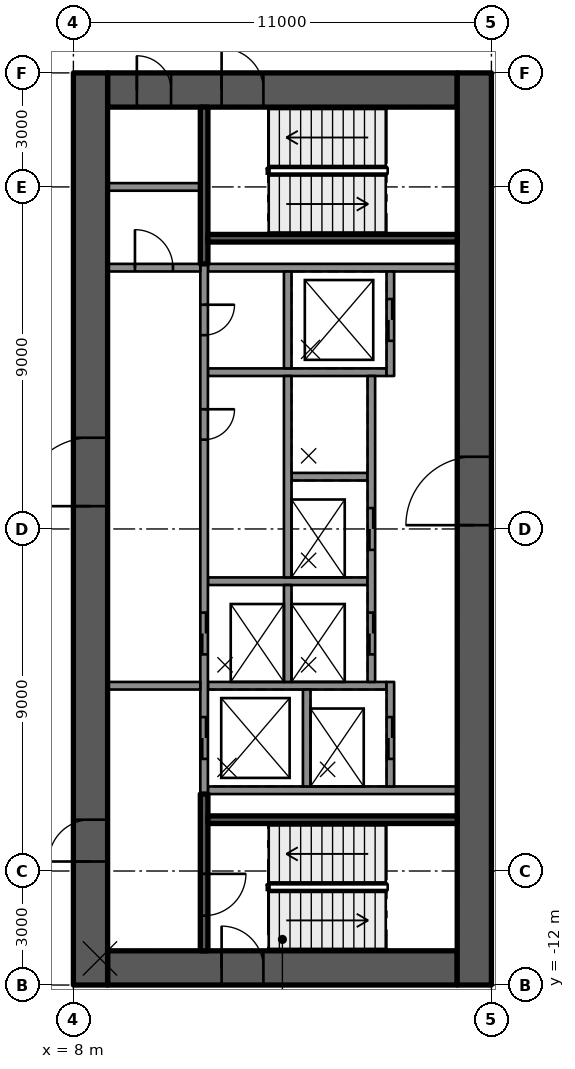
"""IFC4 building model, lengths in metres.
Left out: names, types, materials, properties, quantities, classifications, styles, units other than length and angle.
Written with IfcOpenShell. Run it as: python <this file> out.ifc"""

import sys

from ifc_helpers import new_model, si_unit, direction, frame, frame_2d, origin, place, context, subcontext, project, spatial, rectangle, extrude, element, fill, save


model = new_model("IFC4")
c1 = context("Model", 3, precision=1e-05, world=origin(), true_north=direction((0.0, 1.0)))
c2 = subcontext(c1, "Body", "Model", "MODEL_VIEW")
j1 = project(units=[si_unit("LENGTHUNIT", "METRE"), si_unit("PLANEANGLEUNIT", "RADIAN")], contexts=[c1])
p1 = place(None, origin())
s1 = spatial("IfcSite", under=j1, at=p1, CompositionType="ELEMENT")
p2 = place(p1, origin())
s2 = spatial("IfcBuilding", under=s1, at=p2, CompositionType="ELEMENT")
p3 = place(p2, frame((0.0, 0.0, 184.6)))
s3 = spatial("IfcBuildingStorey", under=s2, at=p3, CompositionType="ELEMENT", Elevation=184.6)
p4 = place(p3, frame((8.9, 11.55, 0.0), z_axis=(0.0, 0.0, 1.0), x_axis=(1.0, 0.0, 0.0)))
e1 = element("IfcWall", 1, at=p4, inside=s3, PredefinedType="SHEAR", context=c2, shape_type="SweptSolid", body=[
    extrude(rectangle(XDim=9.2, YDim=0.9, at=frame_2d((4.6, 0.0))), origin(), (0.0, 0.0, 1.0), 4.0),
])
p5 = place(p4, frame((3.0, 0.0, 0.0)))
e2 = element("IfcOpeningElement", 2, at=p5, cuts=e1, PredefinedType="OPENING", context=c2, shape_type="SweptSolid", body=[
    extrude(rectangle(XDim=1.1, YDim=2.1, at=frame_2d((0.55, 1.05))), frame((0.0, 0.46, 0.0), z_axis=(0.0, -1.0, 0.0), x_axis=(1.0, 0.0, 0.0)), (0.0, 0.0, 1.0), 0.92),
])
p6 = place(p4, frame((0.77, 0.0, 0.0)))
e3 = element("IfcOpeningElement", 3, at=p6, cuts=e1, PredefinedType="OPENING", context=c2, shape_type="SweptSolid", body=[
    extrude(rectangle(XDim=0.9, YDim=2.1, at=frame_2d((0.45, 1.05))), frame((0.0, 0.46, 0.0), z_axis=(0.0, -1.0, 0.0), x_axis=(1.0, 0.0, 0.0)), (0.0, 0.0, 1.0), 0.92),
])
p7 = place(p3, frame((8.9, -11.55, 0.0), z_axis=(0.0, 0.0, 1.0), x_axis=(1.0, 0.0, 0.0)))
e4 = element("IfcWall", 4, at=p7, inside=s3, PredefinedType="SHEAR", context=c2, shape_type="SweptSolid", body=[
    extrude(rectangle(XDim=9.2, YDim=0.9, at=frame_2d((4.6, 0.0))), origin(), (0.0, 0.0, 1.0), 4.0),
])
p8 = place(p7, frame((3.0, 0.0, 0.0)))
e5 = element("IfcOpeningElement", 5, at=p8, cuts=e4, PredefinedType="OPENING", context=c2, shape_type="SweptSolid", body=[
    extrude(rectangle(XDim=1.1, YDim=2.1, at=frame_2d((0.55, 1.05))), frame((0.0, 0.46, 0.0), z_axis=(0.0, -1.0, 0.0), x_axis=(1.0, 0.0, 0.0)), (0.0, 0.0, 1.0), 0.92),
])
p9 = place(p3, frame((8.45, -12.0, 0.0), z_axis=(0.0, 0.0, 1.0), x_axis=(0.0, 1.0, 0.0)))
e6 = element("IfcWall", 6, at=p9, inside=s3, PredefinedType="SHEAR", context=c2, shape_type="SweptSolid", body=[
    extrude(rectangle(XDim=24.0, YDim=0.9, at=frame_2d((12.0, 0.0))), origin(), (0.0, 0.0, 1.0), 4.0),
])
p10 = place(p9, frame((12.6, 0.0, 0.0)))
e7 = element("IfcOpeningElement", 7, at=p10, cuts=e6, PredefinedType="OPENING", context=c2, shape_type="SweptSolid", body=[
    extrude(rectangle(XDim=1.8, YDim=2.1, at=frame_2d((0.9, 1.05))), frame((0.0, 0.46, 0.0), z_axis=(0.0, -1.0, 0.0), x_axis=(1.0, 0.0, 0.0)), (0.0, 0.0, 1.0), 0.92),
])
p11 = place(p9, frame((3.25, 0.0, 0.0)))
e8 = element("IfcOpeningElement", 8, at=p11, cuts=e6, PredefinedType="OPENING", context=c2, shape_type="SweptSolid", body=[
    extrude(rectangle(XDim=1.1, YDim=2.1, at=frame_2d((0.55, 1.05))), frame((0.0, 0.46, 0.0), z_axis=(0.0, -1.0, 0.0), x_axis=(1.0, 0.0, 0.0)), (0.0, 0.0, 1.0), 0.92),
])
p12 = place(p3, frame((18.55, -12.0, 0.0), z_axis=(0.0, 0.0, 1.0), x_axis=(0.0, 1.0, 0.0)))
e9 = element("IfcWall", 9, at=p12, inside=s3, PredefinedType="SHEAR", context=c2, shape_type="SweptSolid", body=[
    extrude(rectangle(XDim=24.0, YDim=0.9, at=frame_2d((12.0, 0.0))), origin(), (0.0, 0.0, 1.0), 4.0),
])
p13 = place(p12, frame((12.1, 0.0, 0.0)))
e10 = element("IfcOpeningElement", 10, at=p13, cuts=e9, PredefinedType="OPENING", context=c2, shape_type="SweptSolid", body=[
    extrude(rectangle(XDim=1.8, YDim=2.1, at=frame_2d((0.9, 1.05))), frame((0.0, 0.46, 0.0), z_axis=(0.0, -1.0, 0.0), x_axis=(1.0, 0.0, 0.0)), (0.0, 0.0, 1.0), 0.92),
])
for number, where, z_axis, x_axis in (
    (11, (11.54, -6.875, 0.0), (0.0, 0.0, 1.0), (1.0, 0.0, 0.0)),
    (12, (11.54, 6.875, 0.0), (0.0, 0.0, 1.0), (1.0, 0.0, 0.0)),
):
    element("IfcWall", number, at=place(p3, frame(where, z_axis=z_axis, x_axis=x_axis)), inside=s3, PredefinedType="SOLIDWALL", context=c2, shape_type="SweptSolid", body=[
        extrude(rectangle(XDim=6.56, YDim=0.2, at=frame_2d((3.28, 0.0))), origin(), (0.0, 0.0, 1.0), 3.58),
    ])
p14 = place(p3, frame((11.54, 4.125, 0.0), z_axis=(0.0, 0.0, 1.0), x_axis=(1.0, 0.0, 0.0)))
e13 = element("IfcWall", 13, at=p14, inside=s3, PredefinedType="SOLIDWALL", context=c2, shape_type="SweptSolid", body=[
    extrude(rectangle(XDim=4.7, YDim=0.2, at=frame_2d((2.35, 0.0))), origin(), (0.0, 0.0, 1.0), 3.58),
])
p15 = place(p3, frame((13.74, 1.375, 0.0), z_axis=(0.0, 0.0, 1.0), x_axis=(1.0, 0.0, 0.0)))
e14 = element("IfcWall", 14, at=p15, inside=s3, PredefinedType="SOLIDWALL", context=c2, shape_type="SweptSolid", body=[
    extrude(rectangle(XDim=2.0, YDim=0.2, at=frame_2d((1.0, 0.0))), origin(), (0.0, 0.0, 1.0), 3.58),
])
p16 = place(p3, frame((11.54, -1.375, 0.0), z_axis=(0.0, 0.0, 1.0), x_axis=(1.0, 0.0, 0.0)))
e15 = element("IfcWall", 15, at=p16, inside=s3, PredefinedType="SOLIDWALL", context=c2, shape_type="SweptSolid", body=[
    extrude(rectangle(XDim=4.2, YDim=0.2, at=frame_2d((2.1, 0.0))), origin(), (0.0, 0.0, 1.0), 3.58),
])
p17 = place(p3, frame((11.54, -4.125, 0.0), z_axis=(0.0, 0.0, 1.0), x_axis=(1.0, 0.0, 0.0)))
e16 = element("IfcWall", 16, at=p17, inside=s3, PredefinedType="SOLIDWALL", context=c2, shape_type="SweptSolid", body=[
    extrude(rectangle(XDim=4.7, YDim=0.2, at=frame_2d((2.35, 0.0))), origin(), (0.0, 0.0, 1.0), 3.58),
])
p18 = place(p3, frame((11.44, 6.975, 0.0), z_axis=(0.0, 0.0, 1.0), x_axis=(0.0, -1.0, 0.0)))
e17 = element("IfcWall", 17, at=p18, inside=s3, PredefinedType="SOLIDWALL", context=c2, shape_type="SweptSolid", body=[
    extrude(rectangle(XDim=13.95, YDim=0.2, at=frame_2d((6.975, 0.0))), origin(), (0.0, 0.0, 1.0), 3.58),
])
p19 = place(p18, frame((9.175, 0.0, 0.0)))
e18 = element("IfcOpeningElement", 18, at=p19, cuts=e17, PredefinedType="OPENING", context=c2, shape_type="SweptSolid", body=[
    extrude(rectangle(XDim=1.1, YDim=2.1, at=frame_2d((0.55, 1.05))), frame((0.0, 0.11, 0.0), z_axis=(0.0, -1.0, 0.0), x_axis=(1.0, 0.0, 0.0)), (0.0, 0.0, 1.0), 0.22),
])
p20 = place(p18, frame((11.925, 0.0, 0.0)))
e19 = element("IfcOpeningElement", 19, at=p20, cuts=e17, PredefinedType="OPENING", context=c2, shape_type="SweptSolid", body=[
    extrude(rectangle(XDim=1.1, YDim=2.1, at=frame_2d((0.55, 1.05))), frame((0.0, 0.11, 0.0), z_axis=(0.0, -1.0, 0.0), x_axis=(1.0, 0.0, 0.0)), (0.0, 0.0, 1.0), 0.22),
])
p21 = place(p18, frame((1.075, 0.0, 0.0)))
e20 = element("IfcOpeningElement", 20, at=p21, cuts=e17, PredefinedType="OPENING", context=c2, shape_type="SweptSolid", body=[
    extrude(rectangle(XDim=0.8, YDim=2.1, at=frame_2d((0.4, 1.05))), frame((0.0, 0.11, 0.0), z_axis=(0.0, -1.0, 0.0), x_axis=(1.0, 0.0, 0.0)), (0.0, 0.0, 1.0), 0.22),
])
p22 = place(p18, frame((3.825, 0.0, 0.0)))
e21 = element("IfcOpeningElement", 21, at=p22, cuts=e17, PredefinedType="OPENING", context=c2, shape_type="SweptSolid", body=[
    extrude(rectangle(XDim=0.8, YDim=2.1, at=frame_2d((0.4, 1.05))), frame((0.0, 0.11, 0.0), z_axis=(0.0, -1.0, 0.0), x_axis=(1.0, 0.0, 0.0)), (0.0, 0.0, 1.0), 0.22),
])
p23 = place(p3, frame((13.64, 6.775, 0.0), z_axis=(0.0, 0.0, 1.0), x_axis=(0.0, -1.0, 0.0)))
e22 = element("IfcWall", 22, at=p23, inside=s3, PredefinedType="SOLIDWALL", context=c2, shape_type="SweptSolid", body=[
    extrude(rectangle(XDim=2.55, YDim=0.2, at=frame_2d((1.275, 0.0))), origin(), (0.0, 0.0, 1.0), 3.58),
])
p24 = place(p3, frame((13.64, 4.025, 0.0), z_axis=(0.0, 0.0, 1.0), x_axis=(0.0, -1.0, 0.0)))
e23 = element("IfcWall", 23, at=p24, inside=s3, PredefinedType="SOLIDWALL", context=c2, shape_type="SweptSolid", body=[
    extrude(rectangle(XDim=5.3, YDim=0.2, at=frame_2d((2.65, 0.0))), origin(), (0.0, 0.0, 1.0), 3.58),
])
for number, where, z_axis, x_axis in (
    (24, (13.64, -1.475, 0.0), (0.0, 0.0, 1.0), (0.0, -1.0, 0.0)),
    (25, (14.14, -4.225, 0.0), (0.0, 0.0, 1.0), (0.0, -1.0, 0.0)),
):
    element("IfcWall", number, at=place(p3, frame(where, z_axis=z_axis, x_axis=x_axis)), inside=s3, PredefinedType="SOLIDWALL", context=c2, shape_type="SweptSolid", body=[
        extrude(rectangle(XDim=2.55, YDim=0.2, at=frame_2d((1.275, 0.0))), origin(), (0.0, 0.0, 1.0), 3.58),
    ])
p25 = place(p3, frame((16.34, 6.775, 0.0), z_axis=(0.0, 0.0, 1.0), x_axis=(0.0, -1.0, 0.0)))
e26 = element("IfcWall", 26, at=p25, inside=s3, PredefinedType="SOLIDWALL", context=c2, shape_type="SweptSolid", body=[
    extrude(rectangle(XDim=2.75, YDim=0.2, at=frame_2d((1.375, 0.0))), origin(), (0.0, 0.0, 1.0), 3.58),
])
p26 = place(p25, frame((0.725, 0.0, 0.0)))
e27 = element("IfcOpeningElement", 27, at=p26, cuts=e26, PredefinedType="OPENING", context=c2, shape_type="SweptSolid", body=[
    extrude(rectangle(XDim=1.1, YDim=2.1, at=frame_2d((0.55, 1.05))), frame((0.0, 0.11, 0.0), z_axis=(0.0, -1.0, 0.0), x_axis=(1.0, 0.0, 0.0)), (0.0, 0.0, 1.0), 0.22),
])
p27 = place(p3, frame((15.84, 4.025, 0.0), z_axis=(0.0, 0.0, 1.0), x_axis=(0.0, -1.0, 0.0)))
e28 = element("IfcWall", 28, at=p27, inside=s3, PredefinedType="SOLIDWALL", context=c2, shape_type="SweptSolid", body=[
    extrude(rectangle(XDim=8.05, YDim=0.2, at=frame_2d((4.025, 0.0))), origin(), (0.0, 0.0, 1.0), 3.58),
])
p28 = place(p27, frame((3.475, 0.0, 0.0)))
e29 = element("IfcOpeningElement", 29, at=p28, cuts=e28, PredefinedType="OPENING", context=c2, shape_type="SweptSolid", body=[
    extrude(rectangle(XDim=1.1, YDim=2.1, at=frame_2d((0.55, 1.05))), frame((0.0, 0.11, 0.0), z_axis=(0.0, -1.0, 0.0), x_axis=(1.0, 0.0, 0.0)), (0.0, 0.0, 1.0), 0.22),
])
p29 = place(p27, frame((6.225, 0.0, 0.0)))
e30 = element("IfcOpeningElement", 30, at=p29, cuts=e28, PredefinedType="OPENING", context=c2, shape_type="SweptSolid", body=[
    extrude(rectangle(XDim=1.1, YDim=2.1, at=frame_2d((0.55, 1.05))), frame((0.0, 0.11, 0.0), z_axis=(0.0, -1.0, 0.0), x_axis=(1.0, 0.0, 0.0)), (0.0, 0.0, 1.0), 0.22),
])
p30 = place(p3, frame((16.34, -4.025, 0.0), z_axis=(0.0, 0.0, 1.0), x_axis=(0.0, -1.0, 0.0)))
e31 = element("IfcWall", 31, at=p30, inside=s3, PredefinedType="SOLIDWALL", context=c2, shape_type="SweptSolid", body=[
    extrude(rectangle(XDim=2.75, YDim=0.2, at=frame_2d((1.375, 0.0))), origin(), (0.0, 0.0, 1.0), 3.58),
])
p31 = place(p30, frame((0.925, 0.0, 0.0)))
e32 = element("IfcOpeningElement", 32, at=p31, cuts=e31, PredefinedType="OPENING", context=c2, shape_type="SweptSolid", body=[
    extrude(rectangle(XDim=1.1, YDim=2.1, at=frame_2d((0.55, 1.05))), frame((0.0, 0.11, 0.0), z_axis=(0.0, -1.0, 0.0), x_axis=(1.0, 0.0, 0.0)), (0.0, 0.0, 1.0), 0.22),
])
p32 = place(p3, frame((11.44, -6.975, 0.0), z_axis=(0.0, 0.0, 1.0), x_axis=(0.0, -1.0, 0.0)))
e33 = element("IfcWall", 33, at=p32, inside=s3, PredefinedType="SOLIDWALL", context=c2, shape_type="SweptSolid", body=[
    extrude(rectangle(XDim=4.125, YDim=0.2, at=frame_2d((2.062, 0.0))), origin(), (0.0, 0.0, 1.0), 3.58),
])
p33 = place(p32, frame((2.1, 0.0, 0.0)))
e34 = element("IfcOpeningElement", 34, at=p33, cuts=e33, PredefinedType="OPENING", context=c2, shape_type="SweptSolid", body=[
    extrude(rectangle(XDim=1.1, YDim=2.1, at=frame_2d((0.55, 1.05))), frame((0.0, 0.11, 0.0), z_axis=(0.0, -1.0, 0.0), x_axis=(1.0, 0.0, 0.0)), (0.0, 0.0, 1.0), 0.22),
])
p34 = place(p3, frame((11.54, -7.65, 0.0), z_axis=(0.0, 0.0, 1.0), x_axis=(1.0, 0.0, 0.0)))
e35 = element("IfcWall", 35, at=p34, inside=s3, PredefinedType="SOLIDWALL", context=c2, shape_type="SweptSolid", body=[
    extrude(rectangle(XDim=6.56, YDim=0.2, at=frame_2d((3.28, 0.0))), origin(), (0.0, 0.0, 1.0), 3.58),
])
p35 = place(p3, frame((11.44, 11.1, 0.0), z_axis=(0.0, 0.0, 1.0), x_axis=(0.0, -1.0, 0.0)))
e36 = element("IfcWall", 36, at=p35, inside=s3, PredefinedType="SOLIDWALL", context=c2, shape_type="SweptSolid", body=[
    extrude(rectangle(XDim=4.125, YDim=0.2, at=frame_2d((2.062, 0.0))), origin(), (0.0, 0.0, 1.0), 3.58),
])
p36 = place(p3, frame((11.54, 7.65, 0.0), z_axis=(0.0, 0.0, 1.0), x_axis=(1.0, 0.0, 0.0)))
e37 = element("IfcWall", 37, at=p36, inside=s3, PredefinedType="SOLIDWALL", context=c2, shape_type="SweptSolid", body=[
    extrude(rectangle(XDim=6.56, YDim=0.2, at=frame_2d((3.28, 0.0))), origin(), (0.0, 0.0, 1.0), 3.58),
])
p37 = place(p3, frame((8.9, -4.125, 0.0), z_axis=(0.0, 0.0, 1.0), x_axis=(1.0, 0.0, 0.0)))
e38 = element("IfcWall", 38, at=p37, inside=s3, PredefinedType="PARTITIONING", context=c2, shape_type="SweptSolid", body=[
    extrude(rectangle(XDim=2.44, YDim=0.2, at=frame_2d((1.22, 0.0))), origin(), (0.0, 0.0, 1.0), 3.58),
])
p38 = place(p3, frame((8.9, 6.875, 0.0), z_axis=(0.0, 0.0, 1.0), x_axis=(1.0, 0.0, 0.0)))
e39 = element("IfcWall", 39, at=p38, inside=s3, PredefinedType="PARTITIONING", context=c2, shape_type="SweptSolid", body=[
    extrude(rectangle(XDim=2.44, YDim=0.2, at=frame_2d((1.22, 0.0))), origin(), (0.0, 0.0, 1.0), 3.58),
])
p39 = place(p38, frame((0.72, 0.0, 0.0)))
e40 = element("IfcOpeningElement", 40, at=p39, cuts=e39, PredefinedType="OPENING", context=c2, shape_type="SweptSolid", body=[
    extrude(rectangle(XDim=1.0, YDim=2.1, at=frame_2d((0.5, 1.05))), frame((0.0, 0.11, 0.0), z_axis=(0.0, -1.0, 0.0), x_axis=(1.0, 0.0, 0.0)), (0.0, 0.0, 1.0), 0.22),
])
p40 = place(p3, frame((8.9, 9.0, 0.0), z_axis=(0.0, 0.0, 1.0), x_axis=(1.0, 0.0, 0.0)))
e41 = element("IfcWall", 41, at=p40, inside=s3, PredefinedType="PARTITIONING", context=c2, shape_type="SweptSolid", body=[
    extrude(rectangle(XDim=2.44, YDim=0.2, at=frame_2d((1.22, 0.0))), origin(), (0.0, 0.0, 1.0), 3.58),
])
p41 = place(p26, origin())
e42 = element("IfcDoor", 42, at=p41, inside=s3, OperationType="DOUBLE_DOOR_SLIDING", PredefinedType="DOOR", context=c2, shape_type="SweptSolid", body=[
    extrude(rectangle(XDim=1.1, YDim=2.1, at=frame_2d((0.55, 1.05))), frame((0.0, 0.025, 0.0), z_axis=(0.0, -1.0, 0.0), x_axis=(1.0, 0.0, 0.0)), (0.0, 0.0, 1.0), 0.05),
])
fill(e27, e42)
p42 = place(p28, origin())
e43 = element("IfcDoor", 43, at=p42, inside=s3, OperationType="DOUBLE_DOOR_SLIDING", PredefinedType="DOOR", context=c2, shape_type="SweptSolid", body=[
    extrude(rectangle(XDim=1.1, YDim=2.1, at=frame_2d((0.55, 1.05))), frame((0.0, 0.025, 0.0), z_axis=(0.0, -1.0, 0.0), x_axis=(1.0, 0.0, 0.0)), (0.0, 0.0, 1.0), 0.05),
])
fill(e29, e43)
p43 = place(p19, origin())
e44 = element("IfcDoor", 44, at=p43, inside=s3, OperationType="DOUBLE_DOOR_SLIDING", PredefinedType="DOOR", context=c2, shape_type="SweptSolid", body=[
    extrude(rectangle(XDim=1.1, YDim=2.1, at=frame_2d((0.55, 1.05))), frame((0.0, 0.025, 0.0), z_axis=(0.0, -1.0, 0.0), x_axis=(1.0, 0.0, 0.0)), (0.0, 0.0, 1.0), 0.05),
])
fill(e18, e44)
p44 = place(p29, origin())
e45 = element("IfcDoor", 45, at=p44, inside=s3, OperationType="DOUBLE_DOOR_SLIDING", PredefinedType="DOOR", context=c2, shape_type="SweptSolid", body=[
    extrude(rectangle(XDim=1.1, YDim=2.1, at=frame_2d((0.55, 1.05))), frame((0.0, 0.025, 0.0), z_axis=(0.0, -1.0, 0.0), x_axis=(1.0, 0.0, 0.0)), (0.0, 0.0, 1.0), 0.05),
])
fill(e30, e45)
p45 = place(p20, origin())
e46 = element("IfcDoor", 46, at=p45, inside=s3, OperationType="DOUBLE_DOOR_SLIDING", PredefinedType="DOOR", context=c2, shape_type="SweptSolid", body=[
    extrude(rectangle(XDim=1.1, YDim=2.1, at=frame_2d((0.55, 1.05))), frame((0.0, 0.025, 0.0), z_axis=(0.0, -1.0, 0.0), x_axis=(1.0, 0.0, 0.0)), (0.0, 0.0, 1.0), 0.05),
])
fill(e19, e46)
p46 = place(p31, origin())
e47 = element("IfcDoor", 47, at=p46, inside=s3, OperationType="DOUBLE_DOOR_SLIDING", PredefinedType="DOOR", context=c2, shape_type="SweptSolid", body=[
    extrude(rectangle(XDim=1.1, YDim=2.1, at=frame_2d((0.55, 1.05))), frame((0.0, 0.025, 0.0), z_axis=(0.0, -1.0, 0.0), x_axis=(1.0, 0.0, 0.0)), (0.0, 0.0, 1.0), 0.05),
])
fill(e32, e47)
p47 = place(p21, origin())
e48 = element("IfcDoor", 48, at=p47, inside=s3, OperationType="SINGLE_SWING_LEFT", PredefinedType="DOOR", context=c2, shape_type="SweptSolid", body=[
    extrude(rectangle(XDim=0.8, YDim=2.1, at=frame_2d((0.4, 1.05))), frame((0.0, 0.025, 0.0), z_axis=(0.0, -1.0, 0.0), x_axis=(1.0, 0.0, 0.0)), (0.0, 0.0, 1.0), 0.05),
])
fill(e20, e48)
p48 = place(p22, origin())
e49 = element("IfcDoor", 49, at=p48, inside=s3, OperationType="SINGLE_SWING_LEFT", PredefinedType="DOOR", context=c2, shape_type="SweptSolid", body=[
    extrude(rectangle(XDim=0.8, YDim=2.1, at=frame_2d((0.4, 1.05))), frame((0.0, 0.025, 0.0), z_axis=(0.0, -1.0, 0.0), x_axis=(1.0, 0.0, 0.0)), (0.0, 0.0, 1.0), 0.05),
])
fill(e21, e49)
p49 = place(p10, origin())
e50 = element("IfcDoor", 50, at=p49, inside=s3, OperationType="SINGLE_SWING_RIGHT", PredefinedType="DOOR", context=c2, shape_type="SweptSolid", body=[
    extrude(rectangle(XDim=1.8, YDim=2.1, at=frame_2d((0.9, 1.05))), frame((0.0, 0.025, 0.0), z_axis=(0.0, -1.0, 0.0), x_axis=(1.0, 0.0, 0.0)), (0.0, 0.0, 1.0), 0.05),
])
fill(e7, e50)
p50 = place(p13, origin())
e51 = element("IfcDoor", 51, at=p50, inside=s3, OperationType="SINGLE_SWING_RIGHT", PredefinedType="DOOR", context=c2, shape_type="SweptSolid", body=[
    extrude(rectangle(XDim=1.8, YDim=2.1, at=frame_2d((0.9, 1.05))), frame((0.0, 0.025, 0.0), z_axis=(0.0, -1.0, 0.0), x_axis=(1.0, 0.0, 0.0)), (0.0, 0.0, 1.0), 0.05),
])
fill(e10, e51)
p51 = place(p11, origin())
e52 = element("IfcDoor", 52, at=p51, inside=s3, OperationType="SINGLE_SWING_LEFT", PredefinedType="DOOR", context=c2, shape_type="SweptSolid", body=[
    extrude(rectangle(XDim=1.1, YDim=2.1, at=frame_2d((0.55, 1.05))), frame((0.0, 0.025, 0.0), z_axis=(0.0, -1.0, 0.0), x_axis=(1.0, 0.0, 0.0)), (0.0, 0.0, 1.0), 0.05),
])
fill(e8, e52)
p52 = place(p8, origin())
e53 = element("IfcDoor", 53, at=p52, inside=s3, OperationType="SINGLE_SWING_LEFT", PredefinedType="DOOR", context=c2, shape_type="SweptSolid", body=[
    extrude(rectangle(XDim=1.1, YDim=2.1, at=frame_2d((0.55, 1.05))), frame((0.0, 0.025, 0.0), z_axis=(0.0, -1.0, 0.0), x_axis=(1.0, 0.0, 0.0)), (0.0, 0.0, 1.0), 0.05),
])
fill(e5, e53)
p53 = place(p5, origin())
e54 = element("IfcDoor", 54, at=p53, inside=s3, OperationType="SINGLE_SWING_LEFT", PredefinedType="DOOR", context=c2, shape_type="SweptSolid", body=[
    extrude(rectangle(XDim=1.1, YDim=2.1, at=frame_2d((0.55, 1.05))), frame((0.0, 0.025, 0.0), z_axis=(0.0, -1.0, 0.0), x_axis=(1.0, 0.0, 0.0)), (0.0, 0.0, 1.0), 0.05),
])
fill(e2, e54)
p54 = place(p33, origin())
e55 = element("IfcDoor", 55, at=p54, inside=s3, OperationType="SINGLE_SWING_RIGHT", PredefinedType="DOOR", context=c2, shape_type="SweptSolid", body=[
    extrude(rectangle(XDim=1.1, YDim=2.1, at=frame_2d((0.55, 1.05))), frame((0.0, 0.025, 0.0), z_axis=(0.0, -1.0, 0.0), x_axis=(1.0, 0.0, 0.0)), (0.0, 0.0, 1.0), 0.05),
])
fill(e34, e55)
p55 = place(p6, origin())
e56 = element("IfcDoor", 56, at=p55, inside=s3, OperationType="SINGLE_SWING_LEFT", PredefinedType="DOOR", context=c2, shape_type="SweptSolid", body=[
    extrude(rectangle(XDim=0.9, YDim=2.1, at=frame_2d((0.45, 1.05))), frame((0.0, 0.025, 0.0), z_axis=(0.0, -1.0, 0.0), x_axis=(1.0, 0.0, 0.0)), (0.0, 0.0, 1.0), 0.05),
])
fill(e3, e56)
p56 = place(p39, origin())
e57 = element("IfcDoor", 57, at=p56, inside=s3, OperationType="SINGLE_SWING_RIGHT", PredefinedType="DOOR", context=c2, shape_type="SweptSolid", body=[
    extrude(rectangle(XDim=1.0, YDim=2.1, at=frame_2d((0.5, 1.05))), frame((0.0, 0.025, 0.0), z_axis=(0.0, -1.0, 0.0), x_axis=(1.0, 0.0, 0.0)), (0.0, 0.0, 1.0), 0.05),
])
fill(e40, e57)
save(model, sys.argv[1])
